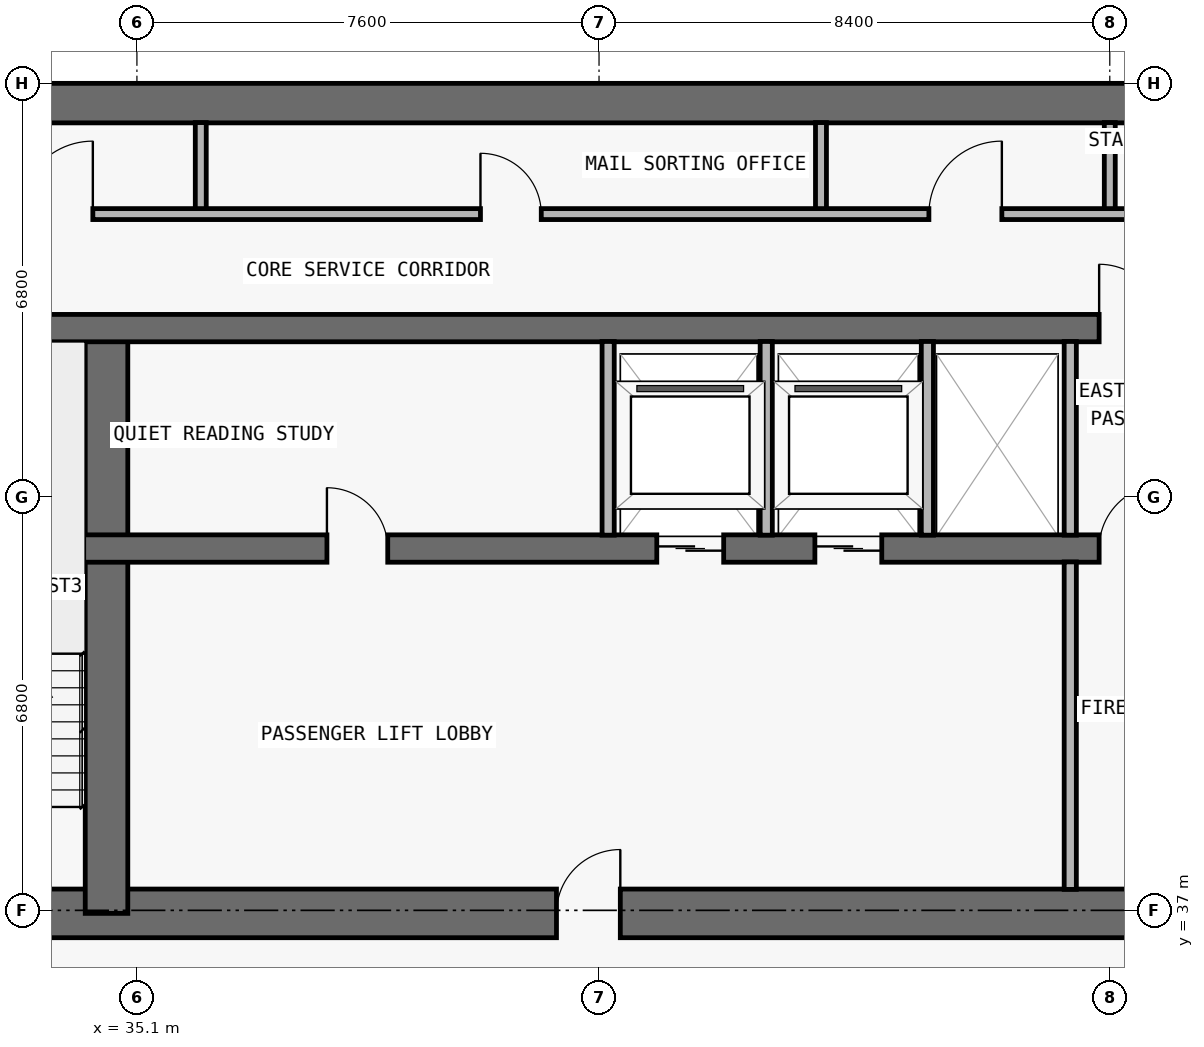
"""IFC4 building model, lengths in metres.
Left out: names, types, materials, properties, quantities, classifications, styles, units other than length and angle.
Written with IfcOpenShell. Run it as: python <this file> out.ifc"""

import sys

from ifc_helpers import new_model, si_unit, direction, frame, frame_2d, origin, place, context, subcontext, project, spatial, rectangle, extrude, element, fill, save


model = new_model("IFC4")
c1 = context("Model", 3, precision=1e-05, world=origin(), true_north=direction((0.0, 1.0)))
c2 = subcontext(c1, "Body", "Model", "MODEL_VIEW")
j1 = project(units=[si_unit("LENGTHUNIT", "METRE"), si_unit("PLANEANGLEUNIT", "RADIAN")], contexts=[c1])
p1 = place(None, origin())
s1 = spatial("IfcSite", under=j1, at=p1, CompositionType="ELEMENT")
p2 = place(p1, origin())
s2 = spatial("IfcBuilding", under=s1, at=p2, CompositionType="ELEMENT")
p3 = place(p2, frame((0.0, 0.0, 129.0)))
s3 = spatial("IfcBuildingStorey", under=s2, at=p3, CompositionType="ELEMENT", Elevation=129.0)
p4 = place(p3, frame((17.85, 36.95, 0.0), z_axis=(0.0, 0.0, 1.0), x_axis=(1.0, 0.0, 0.0)))
e1 = element("IfcWall", 1, at=p4, inside=s3, PredefinedType="SHEAR", context=c2, shape_type="SweptSolid", body=[
    extrude(rectangle(XDim=42.1, YDim=0.8, at=frame_2d((21.05, 0.0))), origin(), (0.0, 0.0, 1.0), 3.05),
])
p5 = place(p4, frame((14.45, 0.0, 0.0)))
e2 = element("IfcOpeningElement", 2, at=p5, cuts=e1, PredefinedType="OPENING", context=c2, shape_type="SweptSolid", body=[
    extrude(rectangle(XDim=1.1, YDim=2.15, at=frame_2d((0.55, 1.075))), frame((0.0, 0.41, 0.0), z_axis=(0.0, -1.0, 0.0), x_axis=(1.0, 0.0, 0.0)), (0.0, 0.0, 1.0), 0.82),
])
p6 = place(p4, frame((6.3, 0.0, 0.0)))
e3 = element("IfcOpeningElement", 3, at=p6, cuts=e1, PredefinedType="OPENING", context=c2, shape_type="SweptSolid", body=[
    extrude(rectangle(XDim=1.05, YDim=2.15, at=frame_2d((0.525, 1.075))), frame((0.0, 0.41, 0.0), z_axis=(0.0, -1.0, 0.0), x_axis=(1.0, 0.0, 0.0)), (0.0, 0.0, 1.0), 0.82),
])
p7 = place(p4, frame((34.8, 0.0, 0.0)))
e4 = element("IfcOpeningElement", 4, at=p7, cuts=e1, PredefinedType="OPENING", context=c2, shape_type="SweptSolid", body=[
    extrude(rectangle(XDim=1.05, YDim=2.15, at=frame_2d((0.525, 1.075))), frame((0.0, 0.41, 0.0), z_axis=(0.0, -1.0, 0.0), x_axis=(1.0, 0.0, 0.0)), (0.0, 0.0, 1.0), 0.82),
])
p8 = place(p4, frame((10.913, 0.0, 0.0)))
e5 = element("IfcOpeningElement", 5, at=p8, cuts=e1, PredefinedType="OPENING", context=c2, shape_type="SweptSolid", body=[
    extrude(rectangle(XDim=1.05, YDim=2.15, at=frame_2d((0.525, 1.075))), frame((0.0, 0.41, 0.0), z_axis=(0.0, -1.0, 0.0), x_axis=(1.0, 0.0, 0.0)), (0.0, 0.0, 1.0), 0.82),
])
p9 = place(p4, frame((24.15, 0.0, 0.0)))
e6 = element("IfcOpeningElement", 6, at=p9, cuts=e1, PredefinedType="OPENING", context=c2, shape_type="SweptSolid", body=[
    extrude(rectangle(XDim=1.05, YDim=2.15, at=frame_2d((0.525, 1.075))), frame((0.0, 0.41, 0.0), z_axis=(0.0, -1.0, 0.0), x_axis=(1.0, 0.0, 0.0)), (0.0, 0.0, 1.0), 0.82),
])
p10 = place(p3, frame((17.85, 50.275, 0.0), z_axis=(0.0, 0.0, 1.0), x_axis=(1.0, 0.0, 0.0)))
e7 = element("IfcWall", 7, at=p10, inside=s3, PredefinedType="SHEAR", context=c2, shape_type="SweptSolid", body=[
    extrude(rectangle(XDim=42.1, YDim=0.65, at=frame_2d((21.05, 0.0))), origin(), (0.0, 0.0, 1.0), 3.05),
])
p11 = place(p3, frame((34.6, 36.95, 0.0), z_axis=(0.0, 0.0, 1.0), x_axis=(0.0, 1.0, 0.0)))
e8 = element("IfcWall", 8, at=p11, inside=s3, PredefinedType="SHEAR", context=c2, shape_type="SweptSolid", body=[
    extrude(rectangle(XDim=9.625, YDim=0.7, at=frame_2d((4.812, 0.0))), origin(), (0.0, 0.0, 1.0), 3.05),
])
p12 = place(p3, frame((22.25, 42.95, 0.0), z_axis=(0.0, 0.0, 1.0), x_axis=(1.0, 0.0, 0.0)))
e9 = element("IfcWall", 9, at=p12, inside=s3, PredefinedType="SHEAR", context=c2, shape_type="SweptSolid", body=[
    extrude(rectangle(XDim=33.3, YDim=0.45, at=frame_2d((16.65, 0.0))), origin(), (0.0, 0.0, 1.0), 3.05),
])
p13 = place(p12, frame((1.05, 0.0, 0.0)))
e10 = element("IfcOpeningElement", 10, at=p13, cuts=e9, PredefinedType="OPENING", context=c2, shape_type="SweptSolid", body=[
    extrude(rectangle(XDim=1.2, YDim=2.2, at=frame_2d((0.6, 1.1))), frame((0.0, 0.235, 0.0), z_axis=(0.0, -1.0, 0.0), x_axis=(1.0, 0.0, 0.0)), (0.0, 0.0, 1.0), 0.47),
])
p14 = place(p12, frame((31.05, 0.0, 0.0)))
e11 = element("IfcOpeningElement", 11, at=p14, cuts=e9, PredefinedType="OPENING", context=c2, shape_type="SweptSolid", body=[
    extrude(rectangle(XDim=1.2, YDim=2.2, at=frame_2d((0.6, 1.1))), frame((0.0, 0.235, 0.0), z_axis=(0.0, -1.0, 0.0), x_axis=(1.0, 0.0, 0.0)), (0.0, 0.0, 1.0), 0.47),
])
p15 = place(p12, frame((21.4, 0.0, 0.0)))
e12 = element("IfcOpeningElement", 12, at=p15, cuts=e9, PredefinedType="OPENING", context=c2, shape_type="SweptSolid", body=[
    extrude(rectangle(XDim=1.1, YDim=2.2, at=frame_2d((0.55, 1.1))), frame((0.0, 0.235, 0.0), z_axis=(0.0, -1.0, 0.0), x_axis=(1.0, 0.0, 0.0)), (0.0, 0.0, 1.0), 0.47),
])
p16 = place(p12, frame((24.0, 0.0, 0.0)))
e13 = element("IfcOpeningElement", 13, at=p16, cuts=e9, PredefinedType="OPENING", context=c2, shape_type="SweptSolid", body=[
    extrude(rectangle(XDim=1.1, YDim=2.2, at=frame_2d((0.55, 1.1))), frame((0.0, 0.235, 0.0), z_axis=(0.0, -1.0, 0.0), x_axis=(1.0, 0.0, 0.0)), (0.0, 0.0, 1.0), 0.47),
])
p17 = place(p12, frame((3.625, 0.0, 0.0)))
e14 = element("IfcOpeningElement", 14, at=p17, cuts=e9, PredefinedType="OPENING", context=c2, shape_type="SweptSolid", body=[
    extrude(rectangle(XDim=1.05, YDim=2.15, at=frame_2d((0.525, 1.075))), frame((0.0, 0.235, 0.0), z_axis=(0.0, -1.0, 0.0), x_axis=(1.0, 0.0, 0.0)), (0.0, 0.0, 1.0), 0.47),
])
p18 = place(p12, frame((28.675, 0.0, 0.0)))
e15 = element("IfcOpeningElement", 15, at=p18, cuts=e9, PredefinedType="OPENING", context=c2, shape_type="SweptSolid", body=[
    extrude(rectangle(XDim=1.05, YDim=2.15, at=frame_2d((0.525, 1.075))), frame((0.0, 0.235, 0.0), z_axis=(0.0, -1.0, 0.0), x_axis=(1.0, 0.0, 0.0)), (0.0, 0.0, 1.0), 0.47),
])
p19 = place(p12, frame((15.975, 0.0, 0.0)))
e16 = element("IfcOpeningElement", 16, at=p19, cuts=e9, PredefinedType="OPENING", context=c2, shape_type="SweptSolid", body=[
    extrude(rectangle(XDim=1.0, YDim=2.2, at=frame_2d((0.5, 1.1))), frame((0.0, 0.235, 0.0), z_axis=(0.0, -1.0, 0.0), x_axis=(1.0, 0.0, 0.0)), (0.0, 0.0, 1.0), 0.47),
])
p20 = place(p3, frame((18.25, 46.575, 0.0), z_axis=(0.0, 0.0, 1.0), x_axis=(1.0, 0.0, 0.0)))
e17 = element("IfcWall", 17, at=p20, inside=s3, PredefinedType="SHEAR", context=c2, shape_type="SweptSolid", body=[
    extrude(rectangle(XDim=41.3, YDim=0.45, at=frame_2d((20.65, 0.0))), origin(), (0.0, 0.0, 1.0), 3.05),
])
p21 = place(p20, frame((7.625, 0.0, 0.0)))
e18 = element("IfcOpeningElement", 18, at=p21, cuts=e17, PredefinedType="OPENING", context=c2, shape_type="SweptSolid", body=[
    extrude(rectangle(XDim=1.05, YDim=2.15, at=frame_2d((0.525, 1.075))), frame((0.0, 0.235, 0.0), z_axis=(0.0, -1.0, 0.0), x_axis=(1.0, 0.0, 0.0)), (0.0, 0.0, 1.0), 0.47),
])
p22 = place(p20, frame((32.675, 0.0, 0.0)))
e19 = element("IfcOpeningElement", 19, at=p22, cuts=e17, PredefinedType="OPENING", context=c2, shape_type="SweptSolid", body=[
    extrude(rectangle(XDim=1.05, YDim=2.15, at=frame_2d((0.525, 1.075))), frame((0.0, 0.235, 0.0), z_axis=(0.0, -1.0, 0.0), x_axis=(1.0, 0.0, 0.0)), (0.0, 0.0, 1.0), 0.47),
])
p23 = place(p3, frame((36.15, 48.45, 0.0), z_axis=(0.0, 0.0, 1.0), x_axis=(0.0, 1.0, 0.0)))
e20 = element("IfcWall", 20, at=p23, inside=s3, PredefinedType="PARTITIONING", context=c2, shape_type="SweptSolid", body=[
    extrude(rectangle(XDim=1.505, YDim=0.18, at=frame_2d((0.752, 0.0))), origin(), (0.0, 0.0, 1.0), 3.05),
])
for number, where, z_axis, x_axis in (
    (21, (42.85, 43.17, 0.0), (0.0, 0.0, 1.0), (0.0, 1.0, 0.0)),
    (22, (45.45, 43.17, 0.0), (0.0, 0.0, 1.0), (0.0, 1.0, 0.0)),
):
    element("IfcWall", number, at=place(p3, frame(where, z_axis=z_axis, x_axis=x_axis)), inside=s3, PredefinedType="PARTITIONING", context=c2, shape_type="SweptSolid", body=[
        extrude(rectangle(XDim=3.185, YDim=0.2, at=frame_2d((1.593, 0.0))), origin(), (0.0, 0.0, 1.0), 3.05),
    ])
p24 = place(p3, frame((46.35, 48.45, 0.0), z_axis=(0.0, 0.0, 1.0), x_axis=(0.0, 1.0, 0.0)))
e23 = element("IfcWall", 23, at=p24, inside=s3, PredefinedType="PARTITIONING", context=c2, shape_type="SweptSolid", body=[
    extrude(rectangle(XDim=1.505, YDim=0.18, at=frame_2d((0.752, 0.0))), origin(), (0.0, 0.0, 1.0), 3.05),
])
p25 = place(p3, frame((48.1, 43.17, 0.0), z_axis=(0.0, 0.0, 1.0), x_axis=(0.0, 1.0, 0.0)))
e24 = element("IfcWall", 24, at=p25, inside=s3, PredefinedType="PARTITIONING", context=c2, shape_type="SweptSolid", body=[
    extrude(rectangle(XDim=3.185, YDim=0.2, at=frame_2d((1.593, 0.0))), origin(), (0.0, 0.0, 1.0), 3.05),
])
p26 = place(p3, frame((50.45, 37.345, 0.0), z_axis=(0.0, 0.0, 1.0), x_axis=(0.0, 1.0, 0.0)))
e25 = element("IfcWall", 25, at=p26, inside=s3, PredefinedType="PARTITIONING", context=c2, shape_type="SweptSolid", body=[
    extrude(rectangle(XDim=5.385, YDim=0.2, at=frame_2d((2.692, 0.0))), origin(), (0.0, 0.0, 1.0), 3.05),
])
p27 = place(p3, frame((50.45, 43.17, 0.0), z_axis=(0.0, 0.0, 1.0), x_axis=(0.0, 1.0, 0.0)))
e26 = element("IfcWall", 26, at=p27, inside=s3, PredefinedType="PARTITIONING", context=c2, shape_type="SweptSolid", body=[
    extrude(rectangle(XDim=3.185, YDim=0.2, at=frame_2d((1.593, 0.0))), origin(), (0.0, 0.0, 1.0), 3.05),
])
p28 = place(p3, frame((51.1, 48.45, 0.0), z_axis=(0.0, 0.0, 1.0), x_axis=(0.0, 1.0, 0.0)))
e27 = element("IfcWall", 27, at=p28, inside=s3, PredefinedType="PARTITIONING", context=c2, shape_type="SweptSolid", body=[
    extrude(rectangle(XDim=1.505, YDim=0.18, at=frame_2d((0.752, 0.0))), origin(), (0.0, 0.0, 1.0), 3.05),
])
p29 = place(p3, frame((26.7, 48.45, 0.0), z_axis=(0.0, 0.0, 1.0), x_axis=(1.0, 0.0, 0.0)))
e28 = element("IfcWall", 28, at=p29, inside=s3, PredefinedType="PARTITIONING", context=c2, shape_type="SweptSolid", body=[
    extrude(rectangle(XDim=29.2, YDim=0.18, at=frame_2d((14.6, 0.0))), origin(), (0.0, 0.0, 1.0), 3.05),
])
p30 = place(p29, frame((1.75, 0.0, 0.0)))
e29 = element("IfcOpeningElement", 29, at=p30, cuts=e28, PredefinedType="OPENING", context=c2, shape_type="SweptSolid", body=[
    extrude(rectangle(XDim=1.2, YDim=2.2, at=frame_2d((0.6, 1.1))), frame((0.0, 0.1, 0.0), z_axis=(0.0, -1.0, 0.0), x_axis=(1.0, 0.0, 0.0)), (0.0, 0.0, 1.0), 0.2),
])
p31 = place(p29, frame((6.475, 0.0, 0.0)))
e30 = element("IfcOpeningElement", 30, at=p31, cuts=e28, PredefinedType="OPENING", context=c2, shape_type="SweptSolid", body=[
    extrude(rectangle(XDim=1.2, YDim=2.2, at=frame_2d((0.6, 1.1))), frame((0.0, 0.1, 0.0), z_axis=(0.0, -1.0, 0.0), x_axis=(1.0, 0.0, 0.0)), (0.0, 0.0, 1.0), 0.2),
])
p32 = place(p29, frame((14.05, 0.0, 0.0)))
e31 = element("IfcOpeningElement", 31, at=p32, cuts=e28, PredefinedType="OPENING", context=c2, shape_type="SweptSolid", body=[
    extrude(rectangle(XDim=1.0, YDim=2.2, at=frame_2d((0.5, 1.1))), frame((0.0, 0.1, 0.0), z_axis=(0.0, -1.0, 0.0), x_axis=(1.0, 0.0, 0.0)), (0.0, 0.0, 1.0), 0.2),
])
p33 = place(p29, frame((21.425, 0.0, 0.0)))
e32 = element("IfcOpeningElement", 32, at=p33, cuts=e28, PredefinedType="OPENING", context=c2, shape_type="SweptSolid", body=[
    extrude(rectangle(XDim=1.2, YDim=2.2, at=frame_2d((0.6, 1.1))), frame((0.0, 0.1, 0.0), z_axis=(0.0, -1.0, 0.0), x_axis=(1.0, 0.0, 0.0)), (0.0, 0.0, 1.0), 0.2),
])
p34 = place(p29, frame((26.375, 0.0, 0.0)))
e33 = element("IfcOpeningElement", 33, at=p34, cuts=e28, PredefinedType="OPENING", context=c2, shape_type="SweptSolid", body=[
    extrude(rectangle(XDim=0.85, YDim=2.1, at=frame_2d((0.425, 1.05))), frame((0.0, 0.1, 0.0), z_axis=(0.0, -1.0, 0.0), x_axis=(1.0, 0.0, 0.0)), (0.0, 0.0, 1.0), 0.2),
])
p35 = place(p15, origin())
e34 = element("IfcDoor", 34, at=p35, inside=s3, OperationType="DOUBLE_DOOR_SLIDING", PredefinedType="DOOR", context=c2, shape_type="SweptSolid", body=[
    extrude(rectangle(XDim=1.1, YDim=2.2, at=frame_2d((0.55, 1.1))), frame((0.0, 0.025, 0.0), z_axis=(0.0, -1.0, 0.0), x_axis=(1.0, 0.0, 0.0)), (0.0, 0.0, 1.0), 0.05),
])
fill(e12, e34)
p36 = place(p16, origin())
e35 = element("IfcDoor", 35, at=p36, inside=s3, OperationType="DOUBLE_DOOR_SLIDING", PredefinedType="DOOR", context=c2, shape_type="SweptSolid", body=[
    extrude(rectangle(XDim=1.1, YDim=2.2, at=frame_2d((0.55, 1.1))), frame((0.0, 0.025, 0.0), z_axis=(0.0, -1.0, 0.0), x_axis=(1.0, 0.0, 0.0)), (0.0, 0.0, 1.0), 0.05),
])
fill(e13, e35)
p37 = place(p18, origin())
e36 = element("IfcDoor", 36, at=p37, inside=s3, OperationType="SINGLE_SWING_RIGHT", PredefinedType="DOOR", context=c2, shape_type="SweptSolid", body=[
    extrude(rectangle(XDim=1.05, YDim=2.15, at=frame_2d((0.525, 1.075))), frame((0.0, 0.025, 0.0), z_axis=(0.0, -1.0, 0.0), x_axis=(1.0, 0.0, 0.0)), (0.0, 0.0, 1.0), 0.05),
])
fill(e15, e36)
p38 = place(p9, origin())
e37 = element("IfcDoor", 37, at=p38, inside=s3, OperationType="SINGLE_SWING_RIGHT", PredefinedType="DOOR", context=c2, shape_type="SweptSolid", body=[
    extrude(rectangle(XDim=1.05, YDim=2.15, at=frame_2d((0.525, 1.075))), frame((0.0, 0.025, 0.0), z_axis=(0.0, -1.0, 0.0), x_axis=(1.0, 0.0, 0.0)), (0.0, 0.0, 1.0), 0.05),
])
fill(e6, e37)
p39 = place(p19, origin())
e38 = element("IfcDoor", 38, at=p39, inside=s3, OperationType="SINGLE_SWING_LEFT", PredefinedType="DOOR", context=c2, shape_type="SweptSolid", body=[
    extrude(rectangle(XDim=1.0, YDim=2.2, at=frame_2d((0.5, 1.1))), frame((0.0, 0.025, 0.0), z_axis=(0.0, -1.0, 0.0), x_axis=(1.0, 0.0, 0.0)), (0.0, 0.0, 1.0), 0.05),
])
fill(e16, e38)
p40 = place(p22, origin())
e39 = element("IfcDoor", 39, at=p40, inside=s3, OperationType="SINGLE_SWING_LEFT", PredefinedType="DOOR", context=c2, shape_type="SweptSolid", body=[
    extrude(rectangle(XDim=1.05, YDim=2.15, at=frame_2d((0.525, 1.075))), frame((0.0, 0.025, 0.0), z_axis=(0.0, -1.0, 0.0), x_axis=(1.0, 0.0, 0.0)), (0.0, 0.0, 1.0), 0.05),
])
fill(e19, e39)
p41 = place(p31, origin())
e40 = element("IfcDoor", 40, at=p41, inside=s3, OperationType="SINGLE_SWING_RIGHT", PredefinedType="DOOR", context=c2, shape_type="SweptSolid", body=[
    extrude(rectangle(XDim=1.2, YDim=2.2, at=frame_2d((0.6, 1.1))), frame((0.0, 0.025, 0.0), z_axis=(0.0, -1.0, 0.0), x_axis=(1.0, 0.0, 0.0)), (0.0, 0.0, 1.0), 0.05),
])
fill(e30, e40)
p42 = place(p32, origin())
e41 = element("IfcDoor", 41, at=p42, inside=s3, OperationType="SINGLE_SWING_LEFT", PredefinedType="DOOR", context=c2, shape_type="SweptSolid", body=[
    extrude(rectangle(XDim=1.0, YDim=2.2, at=frame_2d((0.5, 1.1))), frame((0.0, 0.025, 0.0), z_axis=(0.0, -1.0, 0.0), x_axis=(1.0, 0.0, 0.0)), (0.0, 0.0, 1.0), 0.05),
])
fill(e31, e41)
p43 = place(p33, origin())
e42 = element("IfcDoor", 42, at=p43, inside=s3, OperationType="SINGLE_SWING_RIGHT", PredefinedType="DOOR", context=c2, shape_type="SweptSolid", body=[
    extrude(rectangle(XDim=1.2, YDim=2.2, at=frame_2d((0.6, 1.1))), frame((0.0, 0.025, 0.0), z_axis=(0.0, -1.0, 0.0), x_axis=(1.0, 0.0, 0.0)), (0.0, 0.0, 1.0), 0.05),
])
fill(e32, e42)
save(model, sys.argv[1])
